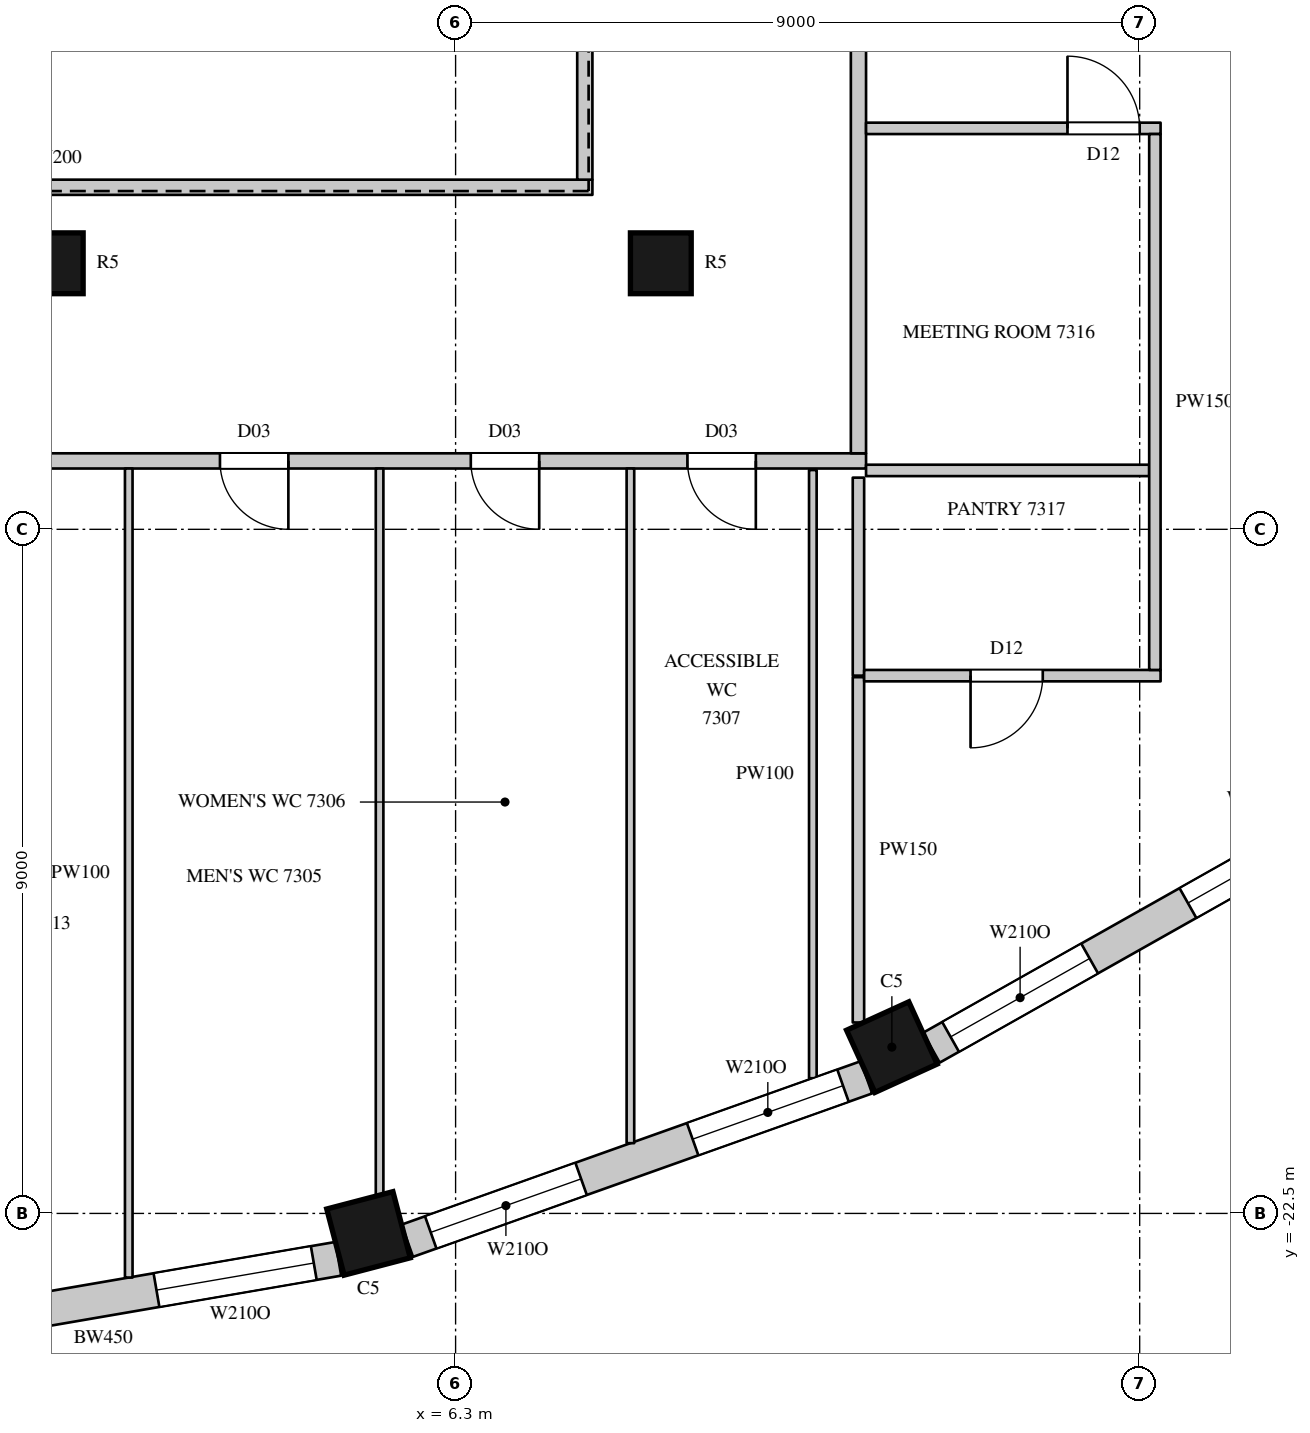
"""IFC4 building model, lengths in metres.
Left out: names, types, materials, properties, quantities, classifications, styles, units other than length and angle.
Written with IfcOpenShell. Run it as: python <this file> out.ifc"""

import sys

from ifc_helpers import new_model, si_unit, direction, frame, frame_2d, origin, origin_2d, place, context, subcontext, project, spatial, rectangle, circle, extrude, element, fill, save


model = new_model("IFC4")
c1 = context("Model", 3, precision=1e-05, world=origin(), true_north=direction((0.0, 1.0)))
c2 = subcontext(c1, "Body", "Model", "MODEL_VIEW")
j1 = project(units=[si_unit("LENGTHUNIT", "METRE"), si_unit("PLANEANGLEUNIT", "RADIAN")], contexts=[c1])
p1 = place(None, origin())
s1 = spatial("IfcSite", under=j1, at=p1, CompositionType="ELEMENT")
p2 = place(p1, origin())
s2 = spatial("IfcBuilding", under=s1, at=p2, CompositionType="ELEMENT")
p3 = place(p2, frame((0.0, 0.0, 321.3)))
s3 = spatial("IfcBuildingStorey", under=s2, at=p3, CompositionType="ELEMENT", Elevation=321.3)
for number, where, z_axis, x_axis in (
    (1, (5.154, -22.763, 0.0), (0.0, 0.0, 1.0), (0.967, 0.253, 0.0)),
    (2, (12.04, -20.312, 0.0), (0.0, 0.0, 1.0), (0.91, 0.415, 0.0)),
):
    element("IfcColumn", number, at=place(p3, frame(where, z_axis=z_axis, x_axis=x_axis)), inside=s3, PredefinedType="COLUMN", context=c2, shape_type="SweptSolid", body=[
        extrude(rectangle(XDim=0.9, YDim=0.9, at=origin_2d()), origin(), (0.0, 0.0, 1.0), 4.1),
    ])
for number, where, z_axis, x_axis in (
    (3, (1.0, -10.0, 0.0), (0.0, 0.0, 1.0), (1.0, 0.0, 0.0)),
    (4, (9.0, -10.0, 0.0), (0.0, 0.0, 1.0), (1.0, 0.0, 0.0)),
):
    element("IfcColumn", number, at=place(p3, frame(where, z_axis=z_axis, x_axis=x_axis)), inside=s3, PredefinedType="COLUMN", context=c2, shape_type="SweptSolid", body=[
        extrude(circle(Radius=0.4, at=origin_2d()), origin(), (0.0, 0.0, 1.0), 4.1),
    ])
p4 = place(p3, frame((-1.562, -24.185, 0.0), z_axis=(0.0, 0.0, 1.0), x_axis=(0.985502073964, 0.169663379113, 0.0)))
e5 = element("IfcWall", 5, at=p4, inside=s3, PredefinedType="SOLIDWALL", context=c2, shape_type="SweptSolid", body=[
    extrude(rectangle(XDim=6.412, YDim=0.45, at=frame_2d((3.206, 0.0))), origin(), (0.0, 0.0, 1.0), 3.8),
])
p5 = place(p4, frame((0.327, 0.0, 1.05)))
e6 = element("IfcOpeningElement", 6, at=p5, cuts=e5, PredefinedType="OPENING", context=c2, shape_type="SweptSolid", body=[
    extrude(rectangle(XDim=2.1, YDim=2.4, at=frame_2d((1.05, 1.2))), frame((0.0, 0.235, 0.0), z_axis=(0.0, -1.0, 0.0), x_axis=(1.0, 0.0, 0.0)), (0.0, 0.0, 1.0), 0.47),
])
p6 = place(p4, frame((3.985, 0.0, 1.05)))
e7 = element("IfcOpeningElement", 7, at=p6, cuts=e5, PredefinedType="OPENING", context=c2, shape_type="SweptSolid", body=[
    extrude(rectangle(XDim=2.1, YDim=2.4, at=frame_2d((1.05, 1.2))), frame((0.0, 0.235, 0.0), z_axis=(0.0, -1.0, 0.0), x_axis=(1.0, 0.0, 0.0)), (0.0, 0.0, 1.0), 0.47),
])
p7 = place(p3, frame((5.665, -22.859, 0.0), z_axis=(0.0, 0.0, 1.0), x_axis=(0.942108340262, 0.335308626803, 0.0)))
e8 = element("IfcWall", 8, at=p7, inside=s3, PredefinedType="SOLIDWALL", context=c2, shape_type="SweptSolid", body=[
    extrude(rectangle(XDim=6.412, YDim=0.45, at=frame_2d((3.206, 0.0))), origin(), (0.0, 0.0, 1.0), 3.8),
])
p8 = place(p7, frame((0.327, 0.0, 1.05)))
e9 = element("IfcOpeningElement", 9, at=p8, cuts=e8, PredefinedType="OPENING", context=c2, shape_type="SweptSolid", body=[
    extrude(rectangle(XDim=2.1, YDim=2.4, at=frame_2d((1.05, 1.2))), frame((0.0, 0.235, 0.0), z_axis=(0.0, -1.0, 0.0), x_axis=(1.0, 0.0, 0.0)), (0.0, 0.0, 1.0), 0.47),
])
p9 = place(p7, frame((3.985, 0.0, 1.05)))
e10 = element("IfcOpeningElement", 10, at=p9, cuts=e8, PredefinedType="OPENING", context=c2, shape_type="SweptSolid", body=[
    extrude(rectangle(XDim=2.1, YDim=2.4, at=frame_2d((1.05, 1.2))), frame((0.0, 0.235, 0.0), z_axis=(0.0, -1.0, 0.0), x_axis=(1.0, 0.0, 0.0)), (0.0, 0.0, 1.0), 0.47),
])
p10 = place(p3, frame((12.559, -20.32, 0.0), z_axis=(0.0, 0.0, 1.0), x_axis=(0.871065783524, 0.491166367714, 0.0)))
e11 = element("IfcWall", 11, at=p10, inside=s3, PredefinedType="SOLIDWALL", context=c2, shape_type="SweptSolid", body=[
    extrude(rectangle(XDim=6.196, YDim=0.45, at=frame_2d((3.098, 0.0))), origin(), (0.0, 0.0, 1.0), 3.8),
])
p11 = place(p10, frame((0.291, 0.0, 1.05)))
e12 = element("IfcOpeningElement", 12, at=p11, cuts=e11, PredefinedType="OPENING", context=c2, shape_type="SweptSolid", body=[
    extrude(rectangle(XDim=2.1, YDim=2.4, at=frame_2d((1.05, 1.2))), frame((0.0, 0.235, 0.0), z_axis=(0.0, -1.0, 0.0), x_axis=(1.0, 0.0, 0.0)), (0.0, 0.0, 1.0), 0.47),
])
p12 = place(p10, frame((3.875, 0.0, 1.05)))
e13 = element("IfcOpeningElement", 13, at=p12, cuts=e11, PredefinedType="OPENING", context=c2, shape_type="SweptSolid", body=[
    extrude(rectangle(XDim=2.1, YDim=2.4, at=frame_2d((1.05, 1.2))), frame((0.0, 0.235, 0.0), z_axis=(0.0, -1.0, 0.0), x_axis=(1.0, 0.0, 0.0)), (0.0, 0.0, 1.0), 0.47),
])
p13 = place(p3, frame((-10.9, -12.6, 0.0), z_axis=(0.0, 0.0, 1.0), x_axis=(1.0, 0.0, 0.0)))
e14 = element("IfcWall", 14, at=p13, inside=s3, PredefinedType="PARTITIONING", context=c2, shape_type="SweptSolid", body=[
    extrude(rectangle(XDim=22.6, YDim=0.2, at=frame_2d((11.3, 0.0))), origin(), (0.0, 0.0, 1.0), 3.8),
])
p14 = place(p13, frame((14.1, 0.0, 0.0)))
e15 = element("IfcOpeningElement", 15, at=p14, cuts=e14, PredefinedType="OPENING", context=c2, shape_type="SweptSolid", body=[
    extrude(rectangle(XDim=0.9, YDim=2.2, at=frame_2d((0.45, 1.1))), frame((0.0, 0.11, 0.0), z_axis=(0.0, -1.0, 0.0), x_axis=(1.0, 0.0, 0.0)), (0.0, 0.0, 1.0), 0.22),
])
p15 = place(p13, frame((17.4, 0.0, 0.0)))
e16 = element("IfcOpeningElement", 16, at=p15, cuts=e14, PredefinedType="OPENING", context=c2, shape_type="SweptSolid", body=[
    extrude(rectangle(XDim=0.9, YDim=2.2, at=frame_2d((0.45, 1.1))), frame((0.0, 0.11, 0.0), z_axis=(0.0, -1.0, 0.0), x_axis=(1.0, 0.0, 0.0)), (0.0, 0.0, 1.0), 0.22),
])
p16 = place(p13, frame((20.25, 0.0, 0.0)))
e17 = element("IfcOpeningElement", 17, at=p16, cuts=e14, PredefinedType="OPENING", context=c2, shape_type="SweptSolid", body=[
    extrude(rectangle(XDim=0.9, YDim=2.2, at=frame_2d((0.45, 1.1))), frame((0.0, 0.11, 0.0), z_axis=(0.0, -1.0, 0.0), x_axis=(1.0, 0.0, 0.0)), (0.0, 0.0, 1.0), 0.22),
])
p17 = place(p13, frame((1.95, 0.0, 0.0)))
e18 = element("IfcOpeningElement", 18, at=p17, cuts=e14, PredefinedType="OPENING", context=c2, shape_type="SweptSolid", body=[
    extrude(rectangle(XDim=1.1, YDim=2.4, at=frame_2d((0.55, 1.2))), frame((0.0, 0.11, 0.0), z_axis=(0.0, -1.0, 0.0), x_axis=(1.0, 0.0, 0.0)), (0.0, 0.0, 1.0), 0.22),
])
p18 = place(p13, frame((9.95, 0.0, 0.0)))
e19 = element("IfcOpeningElement", 19, at=p18, cuts=e14, PredefinedType="OPENING", context=c2, shape_type="SweptSolid", body=[
    extrude(rectangle(XDim=1.1, YDim=2.4, at=frame_2d((0.55, 1.2))), frame((0.0, 0.11, 0.0), z_axis=(0.0, -1.0, 0.0), x_axis=(1.0, 0.0, 0.0)), (0.0, 0.0, 1.0), 0.22),
])
p19 = place(p3, frame((-6.1, -9.0, 0.0), z_axis=(0.0, 0.0, 1.0), x_axis=(1.0, 0.0, 0.0)))
e20 = element("IfcWall", 20, at=p19, inside=s3, PredefinedType="PARTITIONING", context=c2, shape_type="SweptSolid", body=[
    extrude(rectangle(XDim=14.2, YDim=0.2, at=frame_2d((7.1, 0.0))), origin(), (0.0, 0.0, 1.0), 3.8),
])
p20 = place(p3, frame((8.0, -8.9, 0.0), z_axis=(0.0, 0.0, 1.0), x_axis=(0.0, 1.0, 0.0)))
e21 = element("IfcWall", 21, at=p20, inside=s3, PredefinedType="PARTITIONING", context=c2, shape_type="SweptSolid", body=[
    extrude(rectangle(XDim=8.88, YDim=0.2, at=frame_2d((4.44, 0.0))), origin(), (0.0, 0.0, 1.0), 3.8),
])
p21 = place(p3, frame((11.6, -12.5, 0.0), z_axis=(0.0, 0.0, 1.0), x_axis=(0.0, 1.0, 0.0)))
e22 = element("IfcWall", 22, at=p21, inside=s3, PredefinedType="PARTITIONING", context=c2, shape_type="SweptSolid", body=[
    extrude(rectangle(XDim=25.0, YDim=0.2, at=frame_2d((12.5, 0.0))), origin(), (0.0, 0.0, 1.0), 3.8),
])
p22 = place(p21, frame((9.4, 0.0, 0.0)))
e23 = element("IfcOpeningElement", 23, at=p22, cuts=e22, PredefinedType="OPENING", context=c2, shape_type="SweptSolid", body=[
    extrude(rectangle(XDim=1.5, YDim=2.4, at=frame_2d((0.75, 1.2))), frame((0.0, 0.11, 0.0), z_axis=(0.0, -1.0, 0.0), x_axis=(1.0, 0.0, 0.0)), (0.0, 0.0, 1.0), 0.22),
])
p23 = place(p21, frame((5.5, 0.0, 0.0)))
e24 = element("IfcOpeningElement", 24, at=p23, cuts=e22, PredefinedType="OPENING", context=c2, shape_type="SweptSolid", body=[
    extrude(rectangle(XDim=1.1, YDim=2.4, at=frame_2d((0.55, 1.2))), frame((0.0, 0.11, 0.0), z_axis=(0.0, -1.0, 0.0), x_axis=(1.0, 0.0, 0.0)), (0.0, 0.0, 1.0), 0.22),
])
p24 = place(p3, frame((11.6, -19.988, 0.0), z_axis=(0.0, 0.0, 1.0), x_axis=(0.0, 1.0, 0.0)))
e25 = element("IfcWall", 25, at=p24, inside=s3, PredefinedType="PARTITIONING", context=c2, shape_type="SweptSolid", body=[
    extrude(rectangle(XDim=4.543, YDim=0.15, at=frame_2d((2.271, 0.0))), origin(), (0.0, 0.0, 1.0), 3.8),
])
p25 = place(p3, frame((11.6, -15.425, 0.0), z_axis=(0.0, 0.0, 1.0), x_axis=(0.0, 1.0, 0.0)))
e26 = element("IfcWall", 26, at=p25, inside=s3, PredefinedType="PARTITIONING", context=c2, shape_type="SweptSolid", body=[
    extrude(rectangle(XDim=2.605, YDim=0.15, at=frame_2d((1.302, 0.0))), origin(), (0.0, 0.0, 1.0), 3.8),
])
p26 = place(p3, frame((11.675, -15.425, 0.0), z_axis=(0.0, 0.0, 1.0), x_axis=(1.0, 0.0, 0.0)))
e27 = element("IfcWall", 27, at=p26, inside=s3, PredefinedType="PARTITIONING", context=c2, shape_type="SweptSolid", body=[
    extrude(rectangle(XDim=3.9, YDim=0.15, at=frame_2d((1.95, 0.0))), origin(), (0.0, 0.0, 1.0), 3.8),
])
p27 = place(p26, frame((1.4, 0.0, 0.0)))
e28 = element("IfcOpeningElement", 28, at=p27, cuts=e27, PredefinedType="OPENING", context=c2, shape_type="SweptSolid", body=[
    extrude(rectangle(XDim=0.95, YDim=2.2, at=frame_2d((0.475, 1.1))), frame((0.0, 0.085, 0.0), z_axis=(0.0, -1.0, 0.0), x_axis=(1.0, 0.0, 0.0)), (0.0, 0.0, 1.0), 0.17),
])
p28 = place(p3, frame((11.7, -12.725, 0.0), z_axis=(0.0, 0.0, 1.0), x_axis=(1.0, 0.0, 0.0)))
e29 = element("IfcWall", 29, at=p28, inside=s3, PredefinedType="PARTITIONING", context=c2, shape_type="SweptSolid", body=[
    extrude(rectangle(XDim=3.725, YDim=0.15, at=frame_2d((1.863, 0.0))), origin(), (0.0, 0.0, 1.0), 3.8),
])
p29 = place(p3, frame((11.7, -8.225, 0.0), z_axis=(0.0, 0.0, 1.0), x_axis=(1.0, 0.0, 0.0)))
e30 = element("IfcWall", 30, at=p29, inside=s3, PredefinedType="PARTITIONING", context=c2, shape_type="SweptSolid", body=[
    extrude(rectangle(XDim=3.875, YDim=0.15, at=frame_2d((1.938, 0.0))), origin(), (0.0, 0.0, 1.0), 3.15),
])
p30 = place(p29, frame((2.65, 0.0, 0.0)))
e31 = element("IfcOpeningElement", 31, at=p30, cuts=e30, PredefinedType="OPENING", context=c2, shape_type="SweptSolid", body=[
    extrude(rectangle(XDim=0.95, YDim=2.2, at=frame_2d((0.475, 1.1))), frame((0.0, 0.085, 0.0), z_axis=(0.0, -1.0, 0.0), x_axis=(1.0, 0.0, 0.0)), (0.0, 0.0, 1.0), 0.17),
])
p31 = place(p3, frame((15.5, -15.35, 0.0), z_axis=(0.0, 0.0, 1.0), x_axis=(0.0, 1.0, 0.0)))
e32 = element("IfcWall", 32, at=p31, inside=s3, PredefinedType="PARTITIONING", context=c2, shape_type="SweptSolid", body=[
    extrude(rectangle(XDim=7.05, YDim=0.15, at=frame_2d((3.525, 0.0))), origin(), (0.0, 0.0, 1.0), 3.8),
])
p32 = place(p3, frame((2.0, -23.344, 0.0), z_axis=(0.0, 0.0, 1.0), x_axis=(0.0, 1.0, 0.0)))
e33 = element("IfcWall", 33, at=p32, inside=s3, PredefinedType="PARTITIONING", context=c2, shape_type="SweptSolid", body=[
    extrude(rectangle(XDim=10.644, YDim=0.1, at=frame_2d((5.322, 0.0))), origin(), (0.0, 0.0, 1.0), 3.8),
])
p33 = place(p3, frame((5.3, -22.25, 0.0), z_axis=(0.0, 0.0, 1.0), x_axis=(0.0, 1.0, 0.0)))
e34 = element("IfcWall", 34, at=p33, inside=s3, PredefinedType="PARTITIONING", context=c2, shape_type="SweptSolid", body=[
    extrude(rectangle(XDim=9.55, YDim=0.1, at=frame_2d((4.775, 0.0))), origin(), (0.0, 0.0, 1.0), 3.8),
])
p34 = place(p3, frame((8.6, -21.576, 0.0), z_axis=(0.0, 0.0, 1.0), x_axis=(0.0, 1.0, 0.0)))
e35 = element("IfcWall", 35, at=p34, inside=s3, PredefinedType="PARTITIONING", context=c2, shape_type="SweptSolid", body=[
    extrude(rectangle(XDim=8.876, YDim=0.1, at=frame_2d((4.438, 0.0))), origin(), (0.0, 0.0, 1.0), 3.8),
])
p35 = place(p3, frame((11.0, -20.721, 0.0), z_axis=(0.0, 0.0, 1.0), x_axis=(0.0, 1.0, 0.0)))
e36 = element("IfcWall", 36, at=p35, inside=s3, PredefinedType="PARTITIONING", context=c2, shape_type="SweptSolid", body=[
    extrude(rectangle(XDim=8.001, YDim=0.1, at=frame_2d((4.001, 0.0))), origin(), (0.0, 0.0, 1.0), 3.8),
])
p36 = place(p6, origin())
e37 = element("IfcWindow", 37, at=p36, inside=s3, PartitioningType="SINGLE_PANEL", PredefinedType="WINDOW", context=c2, shape_type="SweptSolid", body=[
    extrude(rectangle(XDim=2.1, YDim=2.4, at=frame_2d((1.05, 1.2))), frame((0.0, 0.135, 0.0), z_axis=(0.0, -1.0, 0.0), x_axis=(1.0, 0.0, 0.0)), (0.0, 0.0, 1.0), 0.06),
])
fill(e7, e37)
p37 = place(p8, origin())
e38 = element("IfcWindow", 38, at=p37, inside=s3, PartitioningType="SINGLE_PANEL", PredefinedType="WINDOW", context=c2, shape_type="SweptSolid", body=[
    extrude(rectangle(XDim=2.1, YDim=2.4, at=frame_2d((1.05, 1.2))), frame((0.0, 0.135, 0.0), z_axis=(0.0, -1.0, 0.0), x_axis=(1.0, 0.0, 0.0)), (0.0, 0.0, 1.0), 0.06),
])
fill(e9, e38)
p38 = place(p9, origin())
e39 = element("IfcWindow", 39, at=p38, inside=s3, PartitioningType="SINGLE_PANEL", PredefinedType="WINDOW", context=c2, shape_type="SweptSolid", body=[
    extrude(rectangle(XDim=2.1, YDim=2.4, at=frame_2d((1.05, 1.2))), frame((0.0, 0.135, 0.0), z_axis=(0.0, -1.0, 0.0), x_axis=(1.0, 0.0, 0.0)), (0.0, 0.0, 1.0), 0.06),
])
fill(e10, e39)
p39 = place(p11, origin())
e40 = element("IfcWindow", 40, at=p39, inside=s3, PartitioningType="SINGLE_PANEL", PredefinedType="WINDOW", context=c2, shape_type="SweptSolid", body=[
    extrude(rectangle(XDim=2.1, YDim=2.4, at=frame_2d((1.05, 1.2))), frame((0.0, 0.135, 0.0), z_axis=(0.0, -1.0, 0.0), x_axis=(1.0, 0.0, 0.0)), (0.0, 0.0, 1.0), 0.06),
])
fill(e12, e40)
p40 = place(p12, origin())
e41 = element("IfcWindow", 41, at=p40, inside=s3, PartitioningType="SINGLE_PANEL", PredefinedType="WINDOW", context=c2, shape_type="SweptSolid", body=[
    extrude(rectangle(XDim=2.1, YDim=2.4, at=frame_2d((1.05, 1.2))), frame((0.0, 0.135, 0.0), z_axis=(0.0, -1.0, 0.0), x_axis=(1.0, 0.0, 0.0)), (0.0, 0.0, 1.0), 0.06),
])
fill(e13, e41)
p41 = place(p14, origin())
e42 = element("IfcDoor", 42, at=p41, inside=s3, OperationType="SINGLE_SWING_LEFT", PredefinedType="DOOR", context=c2, shape_type="SweptSolid", body=[
    extrude(rectangle(XDim=0.9, YDim=2.2, at=frame_2d((0.45, 1.1))), frame((0.0, 0.025, 0.0), z_axis=(0.0, -1.0, 0.0), x_axis=(1.0, 0.0, 0.0)), (0.0, 0.0, 1.0), 0.05),
])
fill(e15, e42)
p42 = place(p15, origin())
e43 = element("IfcDoor", 43, at=p42, inside=s3, OperationType="SINGLE_SWING_LEFT", PredefinedType="DOOR", context=c2, shape_type="SweptSolid", body=[
    extrude(rectangle(XDim=0.9, YDim=2.2, at=frame_2d((0.45, 1.1))), frame((0.0, 0.025, 0.0), z_axis=(0.0, -1.0, 0.0), x_axis=(1.0, 0.0, 0.0)), (0.0, 0.0, 1.0), 0.05),
])
fill(e16, e43)
p43 = place(p16, origin())
e44 = element("IfcDoor", 44, at=p43, inside=s3, OperationType="SINGLE_SWING_LEFT", PredefinedType="DOOR", context=c2, shape_type="SweptSolid", body=[
    extrude(rectangle(XDim=0.9, YDim=2.2, at=frame_2d((0.45, 1.1))), frame((0.0, 0.025, 0.0), z_axis=(0.0, -1.0, 0.0), x_axis=(1.0, 0.0, 0.0)), (0.0, 0.0, 1.0), 0.05),
])
fill(e17, e44)
p44 = place(p30, origin())
e45 = element("IfcDoor", 45, at=p44, inside=s3, OperationType="SINGLE_SWING_LEFT", PredefinedType="DOOR", context=c2, shape_type="SweptSolid", body=[
    extrude(rectangle(XDim=0.95, YDim=2.2, at=frame_2d((0.475, 1.1))), frame((0.0, 0.025, 0.0), z_axis=(0.0, -1.0, 0.0), x_axis=(1.0, 0.0, 0.0)), (0.0, 0.0, 1.0), 0.05),
])
fill(e31, e45)
p45 = place(p27, origin())
e46 = element("IfcDoor", 46, at=p45, inside=s3, OperationType="SINGLE_SWING_RIGHT", PredefinedType="DOOR", context=c2, shape_type="SweptSolid", body=[
    extrude(rectangle(XDim=0.95, YDim=2.2, at=frame_2d((0.475, 1.1))), frame((0.0, 0.025, 0.0), z_axis=(0.0, -1.0, 0.0), x_axis=(1.0, 0.0, 0.0)), (0.0, 0.0, 1.0), 0.05),
])
fill(e28, e46)
save(model, sys.argv[1])
